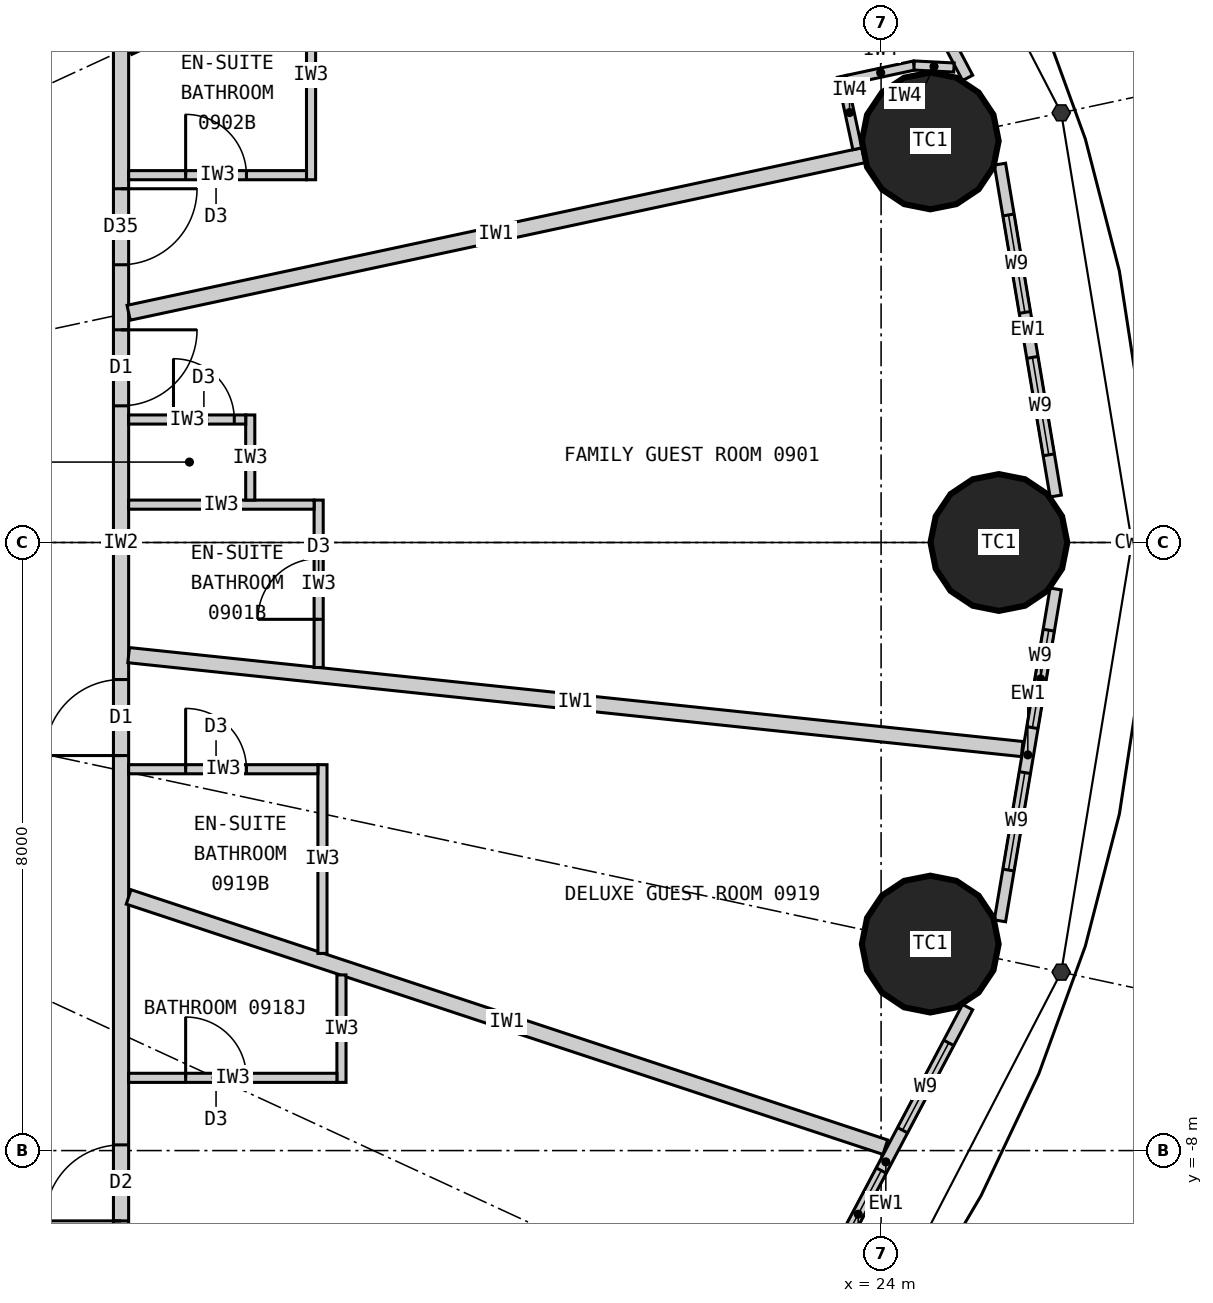
"""IFC4 building model, lengths in metres.
Left out: names, types, materials, properties, quantities, classifications, styles, units other than length and angle.
Written with IfcOpenShell. Run it as: python <this file> out.ifc"""

import sys

from ifc_helpers import new_model, si_unit, direction, frame, frame_2d, origin, origin_2d, place, context, subcontext, project, spatial, rectangle, circle, extrude, element, fill, save


model = new_model("IFC4")
c1 = context("Model", 3, precision=1e-05, world=origin(), true_north=direction((0.0, 1.0)))
c2 = subcontext(c1, "Body", "Model", "MODEL_VIEW")
j1 = project(units=[si_unit("LENGTHUNIT", "METRE"), si_unit("PLANEANGLEUNIT", "RADIAN")], contexts=[c1])
p1 = place(None, origin())
s1 = spatial("IfcSite", under=j1, at=p1, CompositionType="ELEMENT")
p2 = place(p1, origin())
s2 = spatial("IfcBuilding", under=s1, at=p2, CompositionType="ELEMENT")
p3 = place(p2, frame((0.0, 0.0, 42.6)))
s3 = spatial("IfcBuildingStorey", under=s2, at=p3, CompositionType="ELEMENT", Elevation=42.6)
for number, where, z_axis, x_axis in (
    (1, (25.55, 0.0, 0.0), (0.0, 0.0, 1.0), (1.0, 0.0, 0.0)),
    (2, (24.647, 5.283, 0.0), (0.0, 0.0, 1.0), (1.0, 0.0, 0.0)),
    (3, (24.647, -5.283, 0.0), (0.0, 0.0, 1.0), (1.0, 0.0, 0.0)),
):
    element("IfcColumn", number, at=place(p3, frame(where, z_axis=z_axis, x_axis=x_axis)), inside=s3, PredefinedType="COLUMN", context=c2, shape_type="SweptSolid", body=[
        extrude(circle(Radius=0.9, at=origin_2d()), origin(), (0.0, 0.0, 1.0), 3.3),
    ])
p4 = place(p3, frame((26.297, 0.611, 0.0), z_axis=(0.0, 0.0, 1.0), x_axis=(-0.165641751141, 0.986185991727, 0.0)))
e4 = element("IfcWall", 4, at=p4, inside=s3, PredefinedType="ELEMENTEDWALL", context=c2, shape_type="SweptSolid", body=[
    extrude(rectangle(XDim=4.428, YDim=0.15, at=frame_2d((2.214, 0.0))), origin(), (0.0, 0.0, 1.0), 3.05),
])
p5 = place(p4, frame((0.55, 0.0, 0.9)))
e5 = element("IfcOpeningElement", 5, at=p5, cuts=e4, PredefinedType="OPENING", context=c2, shape_type="SweptSolid", body=[
    extrude(rectangle(XDim=1.3, YDim=1.9, at=frame_2d((0.65, 0.95))), frame((0.0, 0.085, 0.0), z_axis=(0.0, -1.0, 0.0), x_axis=(1.0, 0.0, 0.0)), (0.0, 0.0, 1.0), 0.17),
])
p6 = place(p4, frame((2.45, 0.0, 0.9)))
e6 = element("IfcOpeningElement", 6, at=p6, cuts=e4, PredefinedType="OPENING", context=c2, shape_type="SweptSolid", body=[
    extrude(rectangle(XDim=1.3, YDim=1.9, at=frame_2d((0.65, 0.95))), frame((0.0, 0.085, 0.0), z_axis=(0.0, -1.0, 0.0), x_axis=(1.0, 0.0, 0.0)), (0.0, 0.0, 1.0), 0.17),
])
p7 = place(p3, frame((25.139, 6.113, 0.0), z_axis=(0.0, 0.0, 1.0), x_axis=(-0.467303182954, 0.884097129959, 0.0)))
e7 = element("IfcWall", 7, at=p7, inside=s3, PredefinedType="ELEMENTEDWALL", context=c2, shape_type="SweptSolid", body=[
    extrude(rectangle(XDim=4.606, YDim=0.15, at=frame_2d((2.303, 0.0))), origin(), (0.0, 0.0, 1.0), 3.05),
])
p8 = place(p7, frame((0.531, 0.0, 0.9)))
e8 = element("IfcOpeningElement", 8, at=p8, cuts=e7, PredefinedType="OPENING", context=c2, shape_type="SweptSolid", body=[
    extrude(rectangle(XDim=1.3, YDim=1.9, at=frame_2d((0.65, 0.95))), frame((0.0, 0.085, 0.0), z_axis=(0.0, -1.0, 0.0), x_axis=(1.0, 0.0, 0.0)), (0.0, 0.0, 1.0), 0.17),
])
p9 = place(p7, frame((2.432, 0.0, 0.9)))
e9 = element("IfcOpeningElement", 9, at=p9, cuts=e7, PredefinedType="OPENING", context=c2, shape_type="SweptSolid", body=[
    extrude(rectangle(XDim=1.3, YDim=1.9, at=frame_2d((0.65, 0.95))), frame((0.0, 0.085, 0.0), z_axis=(0.0, -1.0, 0.0), x_axis=(1.0, 0.0, 0.0)), (0.0, 0.0, 1.0), 0.17),
])
p10 = place(p3, frame((22.986, -10.185, 0.0), z_axis=(0.0, 0.0, 1.0), x_axis=(0.467303182954, 0.884097129959, 0.0)))
e10 = element("IfcWall", 10, at=p10, inside=s3, PredefinedType="ELEMENTEDWALL", context=c2, shape_type="SweptSolid", body=[
    extrude(rectangle(XDim=4.606, YDim=0.15, at=frame_2d((2.303, 0.0))), origin(), (0.0, 0.0, 1.0), 3.05),
])
p11 = place(p10, frame((0.875, 0.0, 0.9)))
e11 = element("IfcOpeningElement", 11, at=p11, cuts=e10, PredefinedType="OPENING", context=c2, shape_type="SweptSolid", body=[
    extrude(rectangle(XDim=1.3, YDim=1.9, at=frame_2d((0.65, 0.95))), frame((0.0, 0.085, 0.0), z_axis=(0.0, -1.0, 0.0), x_axis=(1.0, 0.0, 0.0)), (0.0, 0.0, 1.0), 0.17),
])
p12 = place(p10, frame((2.775, 0.0, 0.9)))
e12 = element("IfcOpeningElement", 12, at=p12, cuts=e10, PredefinedType="OPENING", context=c2, shape_type="SweptSolid", body=[
    extrude(rectangle(XDim=1.3, YDim=1.9, at=frame_2d((0.65, 0.95))), frame((0.0, 0.085, 0.0), z_axis=(0.0, -1.0, 0.0), x_axis=(1.0, 0.0, 0.0)), (0.0, 0.0, 1.0), 0.17),
])
p13 = place(p3, frame((25.564, -4.978, 0.0), z_axis=(0.0, 0.0, 1.0), x_axis=(0.165641751141, 0.986185991727, 0.0)))
e13 = element("IfcWall", 13, at=p13, inside=s3, PredefinedType="ELEMENTEDWALL", context=c2, shape_type="SweptSolid", body=[
    extrude(rectangle(XDim=4.428, YDim=0.15, at=frame_2d((2.214, 0.0))), origin(), (0.0, 0.0, 1.0), 3.05),
])
p14 = place(p13, frame((0.678, 0.0, 0.9)))
e14 = element("IfcOpeningElement", 14, at=p14, cuts=e13, PredefinedType="OPENING", context=c2, shape_type="SweptSolid", body=[
    extrude(rectangle(XDim=1.3, YDim=1.9, at=frame_2d((0.65, 0.95))), frame((0.0, 0.085, 0.0), z_axis=(0.0, -1.0, 0.0), x_axis=(1.0, 0.0, 0.0)), (0.0, 0.0, 1.0), 0.17),
])
p15 = place(p13, frame((2.578, 0.0, 0.9)))
e15 = element("IfcOpeningElement", 15, at=p15, cuts=e13, PredefinedType="OPENING", context=c2, shape_type="SweptSolid", body=[
    extrude(rectangle(XDim=1.3, YDim=1.9, at=frame_2d((0.65, 0.95))), frame((0.0, 0.085, 0.0), z_axis=(0.0, -1.0, 0.0), x_axis=(1.0, 0.0, 0.0)), (0.0, 0.0, 1.0), 0.17),
])
p16 = place(p3, frame((14.0, -9.9, 0.0), z_axis=(0.0, 0.0, 1.0), x_axis=(0.0, 1.0, 0.0)))
e16 = element("IfcWall", 16, at=p16, inside=s3, PredefinedType="PARTITIONING", context=c2, shape_type="SweptSolid", body=[
    extrude(rectangle(XDim=19.8, YDim=0.2, at=frame_2d((9.9, 0.0))), origin(), (0.0, 0.0, 1.0), 3.05),
])
p17 = place(p16, frame((11.698, 0.0, 0.0)))
e17 = element("IfcOpeningElement", 17, at=p17, cuts=e16, PredefinedType="OPENING", context=c2, shape_type="SweptSolid", body=[
    extrude(rectangle(XDim=1.0, YDim=2.2, at=frame_2d((0.5, 1.1))), frame((0.0, 0.11, 0.0), z_axis=(0.0, -1.0, 0.0), x_axis=(1.0, 0.0, 0.0)), (0.0, 0.0, 1.0), 0.22),
])
p18 = place(p16, frame((13.554, 0.0, 0.0)))
e18 = element("IfcOpeningElement", 18, at=p18, cuts=e16, PredefinedType="OPENING", context=c2, shape_type="SweptSolid", body=[
    extrude(rectangle(XDim=1.0, YDim=2.0, at=frame_2d((0.5, 1.0))), frame((0.0, 0.11, 0.0), z_axis=(0.0, -1.0, 0.0), x_axis=(1.0, 0.0, 0.0)), (0.0, 0.0, 1.0), 0.22),
])
p19 = place(p16, frame((18.698, 0.0, 0.0)))
e19 = element("IfcOpeningElement", 19, at=p19, cuts=e16, PredefinedType="OPENING", context=c2, shape_type="SweptSolid", body=[
    extrude(rectangle(XDim=1.0, YDim=2.2, at=frame_2d((0.5, 1.1))), frame((0.0, 0.11, 0.0), z_axis=(0.0, -1.0, 0.0), x_axis=(1.0, 0.0, 0.0)), (0.0, 0.0, 1.0), 0.22),
])
p20 = place(p16, frame((0.975, 0.0, 0.0)))
e20 = element("IfcOpeningElement", 20, at=p20, cuts=e16, PredefinedType="OPENING", context=c2, shape_type="SweptSolid", body=[
    extrude(rectangle(XDim=1.0, YDim=2.2, at=frame_2d((0.5, 1.1))), frame((0.0, 0.11, 0.0), z_axis=(0.0, -1.0, 0.0), x_axis=(1.0, 0.0, 0.0)), (0.0, 0.0, 1.0), 0.22),
])
p21 = place(p16, frame((7.097, 0.0, 0.0)))
e21 = element("IfcOpeningElement", 21, at=p21, cuts=e16, PredefinedType="OPENING", context=c2, shape_type="SweptSolid", body=[
    extrude(rectangle(XDim=1.0, YDim=2.2, at=frame_2d((0.5, 1.1))), frame((0.0, 0.11, 0.0), z_axis=(0.0, -1.0, 0.0), x_axis=(1.0, 0.0, 0.0)), (0.0, 0.0, 1.0), 0.22),
])
p22 = place(p3, frame((14.1, 3.022, 0.0), z_axis=(0.0, 0.0, 1.0), x_axis=(0.977786510688, 0.209603290805, 0.0)))
e22 = element("IfcWall", 22, at=p22, inside=s3, PredefinedType="PARTITIONING", context=c2, shape_type="SweptSolid", body=[
    extrude(rectangle(XDim=9.887, YDim=0.2, at=frame_2d((4.943, 0.0))), origin(), (0.0, 0.0, 1.0), 2.05),
])
p23 = place(p3, frame((14.1, 6.512, 0.0), z_axis=(0.0, 0.0, 1.0), x_axis=(0.907842433118, 0.41931147925, 0.0)))
e23 = element("IfcWall", 23, at=p23, inside=s3, PredefinedType="PARTITIONING", context=c2, shape_type="SweptSolid", body=[
    extrude(rectangle(XDim=7.823, YDim=0.2, at=frame_2d((3.912, 0.0))), origin(), (0.0, 0.0, 1.0), 2.15),
])
p24 = place(p3, frame((14.1, -4.663, 0.0), z_axis=(0.0, 0.0, 1.0), x_axis=(0.949432655039, -0.31397075269, 0.0)))
e24 = element("IfcWall", 24, at=p24, inside=s3, PredefinedType="PARTITIONING", context=c2, shape_type="SweptSolid", body=[
    extrude(rectangle(XDim=10.486, YDim=0.2, at=frame_2d((5.243, 0.0))), origin(), (0.0, 0.0, 1.0), 3.05),
])
p25 = place(p3, frame((14.1, -1.482, 0.0), z_axis=(0.0, 0.0, 1.0), x_axis=(0.994522076235, -0.104526742422, 0.0)))
e25 = element("IfcWall", 25, at=p25, inside=s3, PredefinedType="PARTITIONING", context=c2, shape_type="SweptSolid", body=[
    extrude(rectangle(XDim=11.821, YDim=0.2, at=frame_2d((5.91, 0.0))), origin(), (0.0, 0.0, 1.0), 2.2),
])
p26 = place(p3, frame((16.6, -1.645, 0.0), z_axis=(0.0, 0.0, 1.0), x_axis=(0.0, 1.0, 0.0)))
e26 = element("IfcWall", 26, at=p26, inside=s3, PredefinedType="PARTITIONING", context=c2, shape_type="SweptSolid", body=[
    extrude(rectangle(XDim=2.203, YDim=0.12, at=frame_2d((1.102, 0.0))), origin(), (0.0, 0.0, 1.0), 3.05),
])
p27 = place(p26, frame((0.634, 0.0, 0.0)))
e27 = element("IfcOpeningElement", 27, at=p27, cuts=e26, PredefinedType="OPENING", context=c2, shape_type="SweptSolid", body=[
    extrude(rectangle(XDim=0.8, YDim=2.1, at=frame_2d((0.4, 1.05))), frame((0.0, 0.07, 0.0), z_axis=(0.0, -1.0, 0.0), x_axis=(1.0, 0.0, 0.0)), (0.0, 0.0, 1.0), 0.14),
])
p28 = place(p3, frame((14.1, 0.498, 0.0), z_axis=(0.0, 0.0, 1.0), x_axis=(1.0, 0.0, 0.0)))
e28 = element("IfcWall", 28, at=p28, inside=s3, PredefinedType="PARTITIONING", context=c2, shape_type="SweptSolid", body=[
    extrude(rectangle(XDim=2.44, YDim=0.12, at=frame_2d((1.22, 0.0))), origin(), (0.0, 0.0, 1.0), 3.05),
])
p29 = place(p3, frame((15.7, 0.558, 0.0), z_axis=(0.0, 0.0, 1.0), x_axis=(0.0, 1.0, 0.0)))
e29 = element("IfcWall", 29, at=p29, inside=s3, PredefinedType="PARTITIONING", context=c2, shape_type="SweptSolid", body=[
    extrude(rectangle(XDim=1.12, YDim=0.12, at=frame_2d((0.56, 0.0))), origin(), (0.0, 0.0, 1.0), 3.05),
])
p30 = place(p3, frame((14.1, 1.618, 0.0), z_axis=(0.0, 0.0, 1.0), x_axis=(1.0, 0.0, 0.0)))
e30 = element("IfcWall", 30, at=p30, inside=s3, PredefinedType="PARTITIONING", context=c2, shape_type="SweptSolid", body=[
    extrude(rectangle(XDim=1.54, YDim=0.12, at=frame_2d((0.77, 0.0))), origin(), (0.0, 0.0, 1.0), 2.2),
])
p31 = place(p30, frame((0.59, 0.0, 0.0)))
e31 = element("IfcOpeningElement", 31, at=p31, cuts=e30, PredefinedType="OPENING", context=c2, shape_type="SweptSolid", body=[
    extrude(rectangle(XDim=0.8, YDim=2.1, at=frame_2d((0.4, 1.05))), frame((0.0, 0.07, 0.0), z_axis=(0.0, -1.0, 0.0), x_axis=(1.0, 0.0, 0.0)), (0.0, 0.0, 1.0), 0.14),
])
p32 = place(p3, frame((16.5, 7.521, 0.0), z_axis=(0.0, 0.0, 1.0), x_axis=(0.0, -1.0, 0.0)))
e32 = element("IfcWall", 32, at=p32, inside=s3, PredefinedType="PARTITIONING", context=c2, shape_type="SweptSolid", body=[
    extrude(rectangle(XDim=2.749, YDim=0.12, at=frame_2d((1.374, 0.0))), origin(), (0.0, 0.0, 1.0), 3.05),
])
p33 = place(p3, frame((14.1, 4.833, 0.0), z_axis=(0.0, 0.0, 1.0), x_axis=(1.0, 0.0, 0.0)))
e33 = element("IfcWall", 33, at=p33, inside=s3, PredefinedType="PARTITIONING", context=c2, shape_type="SweptSolid", body=[
    extrude(rectangle(XDim=2.34, YDim=0.12, at=frame_2d((1.17, 0.0))), origin(), (0.0, 0.0, 1.0), 3.05),
])
p34 = place(p33, frame((0.75, 0.0, 0.0)))
e34 = element("IfcOpeningElement", 34, at=p34, cuts=e33, PredefinedType="OPENING", context=c2, shape_type="SweptSolid", body=[
    extrude(rectangle(XDim=0.8, YDim=2.1, at=frame_2d((0.4, 1.05))), frame((0.0, 0.07, 0.0), z_axis=(0.0, -1.0, 0.0), x_axis=(1.0, 0.0, 0.0)), (0.0, 0.0, 1.0), 0.14),
])
p35 = place(p3, frame((16.9, -5.689, 0.0), z_axis=(0.0, 0.0, 1.0), x_axis=(0.0, -1.0, 0.0)))
e35 = element("IfcWall", 35, at=p35, inside=s3, PredefinedType="PARTITIONING", context=c2, shape_type="SweptSolid", body=[
    extrude(rectangle(XDim=1.414, YDim=0.12, at=frame_2d((0.707, 0.0))), origin(), (0.0, 0.0, 1.0), 3.05),
])
p36 = place(p3, frame((14.1, -7.043, 0.0), z_axis=(0.0, 0.0, 1.0), x_axis=(1.0, 0.0, 0.0)))
e36 = element("IfcWall", 36, at=p36, inside=s3, PredefinedType="PARTITIONING", context=c2, shape_type="SweptSolid", body=[
    extrude(rectangle(XDim=2.74, YDim=0.12, at=frame_2d((1.37, 0.0))), origin(), (0.0, 0.0, 1.0), 3.05),
])
p37 = place(p36, frame((0.75, 0.0, 0.0)))
e37 = element("IfcOpeningElement", 37, at=p37, cuts=e36, PredefinedType="OPENING", context=c2, shape_type="SweptSolid", body=[
    extrude(rectangle(XDim=0.8, YDim=2.1, at=frame_2d((0.4, 1.05))), frame((0.0, 0.07, 0.0), z_axis=(0.0, -1.0, 0.0), x_axis=(1.0, 0.0, 0.0)), (0.0, 0.0, 1.0), 0.14),
])
p38 = place(p3, frame((16.65, -5.406, 0.0), z_axis=(0.0, 0.0, 1.0), x_axis=(0.0, 1.0, 0.0)))
e38 = element("IfcWall", 38, at=p38, inside=s3, PredefinedType="PARTITIONING", context=c2, shape_type="SweptSolid", body=[
    extrude(rectangle(XDim=2.483, YDim=0.12, at=frame_2d((1.242, 0.0))), origin(), (0.0, 0.0, 1.0), 3.05),
])
p39 = place(p3, frame((14.1, -2.983, 0.0), z_axis=(0.0, 0.0, 1.0), x_axis=(1.0, 0.0, 0.0)))
e39 = element("IfcWall", 39, at=p39, inside=s3, PredefinedType="PARTITIONING", context=c2, shape_type="SweptSolid", body=[
    extrude(rectangle(XDim=2.49, YDim=0.12, at=frame_2d((1.245, 0.0))), origin(), (0.0, 0.0, 1.0), 3.05),
])
p40 = place(p39, frame((0.75, 0.0, 0.0)))
e40 = element("IfcOpeningElement", 40, at=p40, cuts=e39, PredefinedType="OPENING", context=c2, shape_type="SweptSolid", body=[
    extrude(rectangle(XDim=0.8, YDim=2.1, at=frame_2d((0.4, 1.05))), frame((0.0, 0.07, 0.0), z_axis=(0.0, -1.0, 0.0), x_axis=(1.0, 0.0, 0.0)), (0.0, 0.0, 1.0), 0.14),
])
p41 = place(p3, frame((23.687, 5.18, 0.0), z_axis=(0.0, 0.0, 1.0), x_axis=(-0.209443540911, 0.977820741839, 0.0)))
e41 = element("IfcWall", 41, at=p41, inside=s3, PredefinedType="PARTITIONING", context=c2, shape_type="SweptSolid", body=[
    extrude(rectangle(XDim=0.975, YDim=0.12, at=frame_2d((0.487, 0.0))), origin(), (0.0, 0.0, 1.0), 3.05),
])
p42 = place(p3, frame((23.554, 6.087, 0.0), z_axis=(0.0, 0.0, 1.0), x_axis=(0.977762694187, 0.209714362543, 0.0)))
e42 = element("IfcWall", 42, at=p42, inside=s3, PredefinedType="PARTITIONING", context=c2, shape_type="SweptSolid", body=[
    extrude(rectangle(XDim=0.9, YDim=0.12, at=frame_2d((0.45, 0.0))), origin(), (0.0, 0.0, 1.0), 3.05),
])
p43 = place(p3, frame((24.434, 6.275, 0.0), z_axis=(0.0, 0.0, 1.0), x_axis=(0.998714959873, -0.050679669751, 0.0)))
e43 = element("IfcWall", 43, at=p43, inside=s3, PredefinedType="PARTITIONING", context=c2, shape_type="SweptSolid", body=[
    extrude(rectangle(XDim=0.525, YDim=0.12, at=frame_2d((0.263, 0.0))), origin(), (0.0, 0.0, 1.0), 3.05),
])
p44 = place(p5, origin())
e44 = element("IfcWindow", 44, at=p44, inside=s3, PartitioningType="SINGLE_PANEL", PredefinedType="WINDOW", context=c2, shape_type="SweptSolid", body=[
    extrude(rectangle(XDim=1.3, YDim=1.9, at=frame_2d((0.65, 0.95))), frame((0.0, 0.03, 0.0), z_axis=(0.0, -1.0, 0.0), x_axis=(1.0, 0.0, 0.0)), (0.0, 0.0, 1.0), 0.06),
])
fill(e5, e44)
p45 = place(p6, origin())
e45 = element("IfcWindow", 45, at=p45, inside=s3, PartitioningType="SINGLE_PANEL", PredefinedType="WINDOW", context=c2, shape_type="SweptSolid", body=[
    extrude(rectangle(XDim=1.3, YDim=1.9, at=frame_2d((0.65, 0.95))), frame((0.0, 0.03, 0.0), z_axis=(0.0, -1.0, 0.0), x_axis=(1.0, 0.0, 0.0)), (0.0, 0.0, 1.0), 0.06),
])
fill(e6, e45)
p46 = place(p11, origin())
e46 = element("IfcWindow", 46, at=p46, inside=s3, PartitioningType="SINGLE_PANEL", PredefinedType="WINDOW", context=c2, shape_type="SweptSolid", body=[
    extrude(rectangle(XDim=1.3, YDim=1.9, at=frame_2d((0.65, 0.95))), frame((0.0, 0.03, 0.0), z_axis=(0.0, -1.0, 0.0), x_axis=(1.0, 0.0, 0.0)), (0.0, 0.0, 1.0), 0.06),
])
fill(e11, e46)
p47 = place(p12, origin())
e47 = element("IfcWindow", 47, at=p47, inside=s3, PartitioningType="SINGLE_PANEL", PredefinedType="WINDOW", context=c2, shape_type="SweptSolid", body=[
    extrude(rectangle(XDim=1.3, YDim=1.9, at=frame_2d((0.65, 0.95))), frame((0.0, 0.03, 0.0), z_axis=(0.0, -1.0, 0.0), x_axis=(1.0, 0.0, 0.0)), (0.0, 0.0, 1.0), 0.06),
])
fill(e12, e47)
p48 = place(p14, origin())
e48 = element("IfcWindow", 48, at=p48, inside=s3, PartitioningType="SINGLE_PANEL", PredefinedType="WINDOW", context=c2, shape_type="SweptSolid", body=[
    extrude(rectangle(XDim=1.3, YDim=1.9, at=frame_2d((0.65, 0.95))), frame((0.0, 0.03, 0.0), z_axis=(0.0, -1.0, 0.0), x_axis=(1.0, 0.0, 0.0)), (0.0, 0.0, 1.0), 0.06),
])
fill(e14, e48)
p49 = place(p15, origin())
e49 = element("IfcWindow", 49, at=p49, inside=s3, PartitioningType="SINGLE_PANEL", PredefinedType="WINDOW", context=c2, shape_type="SweptSolid", body=[
    extrude(rectangle(XDim=1.3, YDim=1.9, at=frame_2d((0.65, 0.95))), frame((0.0, 0.03, 0.0), z_axis=(0.0, -1.0, 0.0), x_axis=(1.0, 0.0, 0.0)), (0.0, 0.0, 1.0), 0.06),
])
fill(e15, e49)
p50 = place(p27, origin())
e50 = element("IfcDoor", 50, at=p50, inside=s3, OperationType="SINGLE_SWING_LEFT", PredefinedType="DOOR", context=c2, shape_type="SweptSolid", body=[
    extrude(rectangle(XDim=0.8, YDim=2.1, at=frame_2d((0.4, 1.05))), frame((0.0, 0.025, 0.0), z_axis=(0.0, -1.0, 0.0), x_axis=(1.0, 0.0, 0.0)), (0.0, 0.0, 1.0), 0.05),
])
fill(e27, e50)
p51 = place(p31, origin())
e51 = element("IfcDoor", 51, at=p51, inside=s3, OperationType="SINGLE_SWING_LEFT", PredefinedType="DOOR", context=c2, shape_type="SweptSolid", body=[
    extrude(rectangle(XDim=0.8, YDim=2.1, at=frame_2d((0.4, 1.05))), frame((0.0, 0.025, 0.0), z_axis=(0.0, -1.0, 0.0), x_axis=(1.0, 0.0, 0.0)), (0.0, 0.0, 1.0), 0.05),
])
fill(e31, e51)
p52 = place(p17, origin())
e52 = element("IfcDoor", 52, at=p52, inside=s3, OperationType="SINGLE_SWING_RIGHT", PredefinedType="DOOR", context=c2, shape_type="SweptSolid", body=[
    extrude(rectangle(XDim=1.0, YDim=2.2, at=frame_2d((0.5, 1.1))), frame((0.0, 0.025, 0.0), z_axis=(0.0, -1.0, 0.0), x_axis=(1.0, 0.0, 0.0)), (0.0, 0.0, 1.0), 0.05),
])
fill(e17, e52)
p53 = place(p34, origin())
e53 = element("IfcDoor", 53, at=p53, inside=s3, OperationType="SINGLE_SWING_LEFT", PredefinedType="DOOR", context=c2, shape_type="SweptSolid", body=[
    extrude(rectangle(XDim=0.8, YDim=2.1, at=frame_2d((0.4, 1.05))), frame((0.0, 0.025, 0.0), z_axis=(0.0, -1.0, 0.0), x_axis=(1.0, 0.0, 0.0)), (0.0, 0.0, 1.0), 0.05),
])
fill(e34, e53)
p54 = place(p18, origin())
e54 = element("IfcDoor", 54, at=p54, inside=s3, OperationType="SINGLE_SWING_RIGHT", PredefinedType="DOOR", context=c2, shape_type="SweptSolid", body=[
    extrude(rectangle(XDim=1.0, YDim=2.0, at=frame_2d((0.5, 1.0))), frame((0.0, 0.025, 0.0), z_axis=(0.0, -1.0, 0.0), x_axis=(1.0, 0.0, 0.0)), (0.0, 0.0, 1.0), 0.05),
])
fill(e18, e54)
p55 = place(p37, origin())
e55 = element("IfcDoor", 55, at=p55, inside=s3, OperationType="SINGLE_SWING_LEFT", PredefinedType="DOOR", context=c2, shape_type="SweptSolid", body=[
    extrude(rectangle(XDim=0.8, YDim=2.1, at=frame_2d((0.4, 1.05))), frame((0.0, 0.025, 0.0), z_axis=(0.0, -1.0, 0.0), x_axis=(1.0, 0.0, 0.0)), (0.0, 0.0, 1.0), 0.05),
])
fill(e37, e55)
p56 = place(p20, origin())
e56 = element("IfcDoor", 56, at=p56, inside=s3, OperationType="SINGLE_SWING_LEFT", PredefinedType="DOOR", context=c2, shape_type="SweptSolid", body=[
    extrude(rectangle(XDim=1.0, YDim=2.2, at=frame_2d((0.5, 1.1))), frame((0.0, 0.025, 0.0), z_axis=(0.0, -1.0, 0.0), x_axis=(1.0, 0.0, 0.0)), (0.0, 0.0, 1.0), 0.05),
])
fill(e20, e56)
p57 = place(p40, origin())
e57 = element("IfcDoor", 57, at=p57, inside=s3, OperationType="SINGLE_SWING_LEFT", PredefinedType="DOOR", context=c2, shape_type="SweptSolid", body=[
    extrude(rectangle(XDim=0.8, YDim=2.1, at=frame_2d((0.4, 1.05))), frame((0.0, 0.025, 0.0), z_axis=(0.0, -1.0, 0.0), x_axis=(1.0, 0.0, 0.0)), (0.0, 0.0, 1.0), 0.05),
])
fill(e40, e57)
p58 = place(p21, origin())
e58 = element("IfcDoor", 58, at=p58, inside=s3, OperationType="SINGLE_SWING_LEFT", PredefinedType="DOOR", context=c2, shape_type="SweptSolid", body=[
    extrude(rectangle(XDim=1.0, YDim=2.2, at=frame_2d((0.5, 1.1))), frame((0.0, 0.025, 0.0), z_axis=(0.0, -1.0, 0.0), x_axis=(1.0, 0.0, 0.0)), (0.0, 0.0, 1.0), 0.05),
])
fill(e21, e58)
save(model, sys.argv[1])
